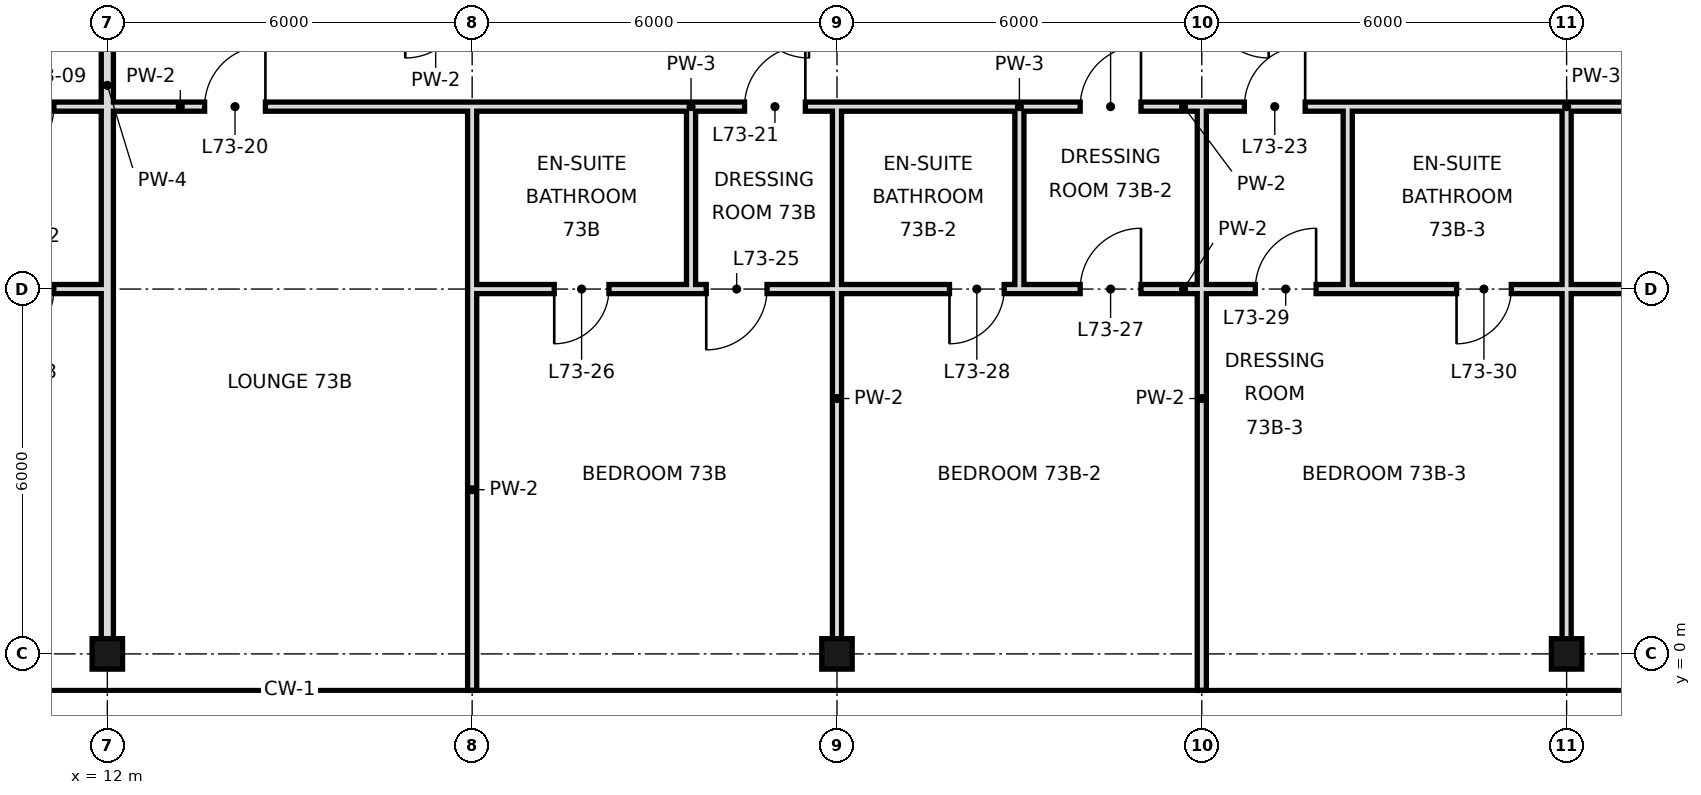
"""IFC4 building model, lengths in metres.
Left out: names, types, materials, properties, quantities, classifications, styles, units other than length and angle.
Written with IfcOpenShell. Run it as: python <this file> out.ifc"""

import sys

from ifc_helpers import new_model, si_unit, direction, frame, frame_2d, origin, origin_2d, place, context, subcontext, project, spatial, rectangle, hollow_rectangle, extrude, element, fill, save


model = new_model("IFC4")
c1 = context("Model", 3, precision=1e-05, world=origin(), true_north=direction((0.0, 1.0)))
c2 = subcontext(c1, "Body", "Model", "MODEL_VIEW")
j1 = project(units=[si_unit("LENGTHUNIT", "METRE"), si_unit("PLANEANGLEUNIT", "RADIAN")], contexts=[c1])
p1 = place(None, origin())
s1 = spatial("IfcSite", under=j1, at=p1, CompositionType="ELEMENT")
p2 = place(p1, origin())
s2 = spatial("IfcBuilding", under=s1, at=p2, CompositionType="ELEMENT")
p3 = place(p2, frame((0.0, 0.0, 308.8)))
s3 = spatial("IfcBuildingStorey", under=s2, at=p3, CompositionType="ELEMENT", Elevation=308.8)
for number, where, z_axis, x_axis in (
    (1, (12.0, 0.0, 0.0), (0.0, 0.0, 1.0), (1.0, 0.0, 0.0)),
    (2, (24.0, 0.0, 0.0), (0.0, 0.0, 1.0), (1.0, 0.0, 0.0)),
    (3, (36.0, 0.0, 0.0), (0.0, 0.0, 1.0), (1.0, 0.0, 0.0)),
):
    element("IfcColumn", number, at=place(p3, frame(where, z_axis=z_axis, x_axis=x_axis)), inside=s3, PredefinedType="COLUMN", context=c2, shape_type="SweptSolid", body=[
        extrude(hollow_rectangle(XDim=0.5, YDim=0.5, WallThickness=0.025, at=origin_2d()), origin(), (0.0, 0.0, 1.0), 3.6),
    ])
p4 = place(p3, frame((12.0, 0.0, 0.0), z_axis=(0.0, 0.0, 1.0), x_axis=(0.0, 1.0, 0.0)))
e4 = element("IfcWall", 4, at=p4, inside=s3, PredefinedType="SOLIDWALL", context=c2, shape_type="SweptSolid", body=[
    extrude(rectangle(XDim=18.7, YDim=0.2, at=frame_2d((9.35, 0.0))), origin(), (0.0, 0.0, 1.0), 2.72),
])
p5 = place(p3, frame((18.0, -0.6, 0.0), z_axis=(0.0, 0.0, 1.0), x_axis=(0.0, 1.0, 0.0)))
e5 = element("IfcWall", 5, at=p5, inside=s3, PredefinedType="PARTITIONING", context=c2, shape_type="SweptSolid", body=[
    extrude(rectangle(XDim=6.6, YDim=0.15, at=frame_2d((3.3, 0.0))), origin(), (0.0, 0.0, 1.0), 2.72),
])
p6 = place(p3, frame((18.0, 6.0, 0.0), z_axis=(0.0, 0.0, 1.0), x_axis=(0.0, 1.0, 0.0)))
e6 = element("IfcWall", 6, at=p6, inside=s3, PredefinedType="PARTITIONING", context=c2, shape_type="SweptSolid", body=[
    extrude(rectangle(XDim=3.0, YDim=0.15, at=frame_2d((1.5, 0.0))), origin(), (0.0, 0.0, 1.0), 2.72),
])
p7 = place(p3, frame((21.6, 6.0, 0.0), z_axis=(0.0, 0.0, 1.0), x_axis=(0.0, 1.0, 0.0)))
e7 = element("IfcWall", 7, at=p7, inside=s3, PredefinedType="PARTITIONING", context=c2, shape_type="SweptSolid", body=[
    extrude(rectangle(XDim=3.0, YDim=0.15, at=frame_2d((1.5, 0.0))), origin(), (0.0, 0.0, 1.0), 3.42),
])
p8 = place(p3, frame((24.0, 0.0, 0.0), z_axis=(0.0, 0.0, 1.0), x_axis=(0.0, 1.0, 0.0)))
e8 = element("IfcWall", 8, at=p8, inside=s3, PredefinedType="PARTITIONING", context=c2, shape_type="SweptSolid", body=[
    extrude(rectangle(XDim=6.0, YDim=0.15, at=frame_2d((3.0, 0.0))), origin(), (0.0, 0.0, 1.0), 2.72),
])
p9 = place(p3, frame((24.0, 6.0, 0.0), z_axis=(0.0, 0.0, 1.0), x_axis=(0.0, 1.0, 0.0)))
e9 = element("IfcWall", 9, at=p9, inside=s3, PredefinedType="PARTITIONING", context=c2, shape_type="SweptSolid", body=[
    extrude(rectangle(XDim=3.0, YDim=0.15, at=frame_2d((1.5, 0.0))), origin(), (0.0, 0.0, 1.0), 2.72),
])
p10 = place(p3, frame((27.0, 6.0, 0.0), z_axis=(0.0, 0.0, 1.0), x_axis=(0.0, 1.0, 0.0)))
e10 = element("IfcWall", 10, at=p10, inside=s3, PredefinedType="PARTITIONING", context=c2, shape_type="SweptSolid", body=[
    extrude(rectangle(XDim=3.0, YDim=0.15, at=frame_2d((1.5, 0.0))), origin(), (0.0, 0.0, 1.0), 3.42),
])
p11 = place(p3, frame((30.0, -0.6, 0.0), z_axis=(0.0, 0.0, 1.0), x_axis=(0.0, 1.0, 0.0)))
e11 = element("IfcWall", 11, at=p11, inside=s3, PredefinedType="PARTITIONING", context=c2, shape_type="SweptSolid", body=[
    extrude(rectangle(XDim=9.6, YDim=0.15, at=frame_2d((4.8, 0.0))), origin(), (0.0, 0.0, 1.0), 2.72),
])
p12 = place(p3, frame((32.4, 6.0, 0.0), z_axis=(0.0, 0.0, 1.0), x_axis=(0.0, 1.0, 0.0)))
e12 = element("IfcWall", 12, at=p12, inside=s3, PredefinedType="PARTITIONING", context=c2, shape_type="SweptSolid", body=[
    extrude(rectangle(XDim=3.0, YDim=0.15, at=frame_2d((1.5, 0.0))), origin(), (0.0, 0.0, 1.0), 3.42),
])
p13 = place(p3, frame((36.0, 0.0, 0.0), z_axis=(0.0, 0.0, 1.0), x_axis=(0.0, 1.0, 0.0)))
e13 = element("IfcWall", 13, at=p13, inside=s3, PredefinedType="PARTITIONING", context=c2, shape_type="SweptSolid", body=[
    extrude(rectangle(XDim=6.0, YDim=0.15, at=frame_2d((3.0, 0.0))), origin(), (0.0, 0.0, 1.0), 2.72),
])
p14 = place(p3, frame((36.0, 6.0, 0.0), z_axis=(0.0, 0.0, 1.0), x_axis=(0.0, 1.0, 0.0)))
e14 = element("IfcWall", 14, at=p14, inside=s3, PredefinedType="PARTITIONING", context=c2, shape_type="SweptSolid", body=[
    extrude(rectangle(XDim=3.0, YDim=0.15, at=frame_2d((1.5, 0.0))), origin(), (0.0, 0.0, 1.0), 2.72),
])
p15 = place(p3, frame((8.4, 6.0, 0.0), z_axis=(0.0, 0.0, 1.0), x_axis=(1.0, 0.0, 0.0)))
e15 = element("IfcWall", 15, at=p15, inside=s3, PredefinedType="PARTITIONING", context=c2, shape_type="SweptSolid", body=[
    extrude(rectangle(XDim=3.6, YDim=0.15, at=frame_2d((1.8, 0.0))), origin(), (0.0, 0.0, 1.0), 2.97),
])
p16 = place(p15, frame((1.72, 0.0, 0.0)))
e16 = element("IfcOpeningElement", 16, at=p16, cuts=e15, PredefinedType="OPENING", context=c2, shape_type="SweptSolid", body=[
    extrude(rectangle(XDim=1.0, YDim=2.4, at=frame_2d((0.5, 1.2))), frame((0.0, 0.085, 0.0), z_axis=(0.0, -1.0, 0.0), x_axis=(1.0, 0.0, 0.0)), (0.0, 0.0, 1.0), 0.17),
])
p17 = place(p3, frame((21.6, 6.0, 0.0), z_axis=(0.0, 0.0, 1.0), x_axis=(1.0, 0.0, 0.0)))
e17 = element("IfcWall", 17, at=p17, inside=s3, PredefinedType="PARTITIONING", context=c2, shape_type="SweptSolid", body=[
    extrude(rectangle(XDim=2.4, YDim=0.15, at=frame_2d((1.2, 0.0))), origin(), (0.0, 0.0, 1.0), 2.97),
])
p18 = place(p17, frame((0.25, 0.0, 0.0)))
e18 = element("IfcOpeningElement", 18, at=p18, cuts=e17, PredefinedType="OPENING", context=c2, shape_type="SweptSolid", body=[
    extrude(rectangle(XDim=1.0, YDim=2.4, at=frame_2d((0.5, 1.2))), frame((0.0, 0.085, 0.0), z_axis=(0.0, -1.0, 0.0), x_axis=(1.0, 0.0, 0.0)), (0.0, 0.0, 1.0), 0.17),
])
p19 = place(p3, frame((27.0, 6.0, 0.0), z_axis=(0.0, 0.0, 1.0), x_axis=(1.0, 0.0, 0.0)))
e19 = element("IfcWall", 19, at=p19, inside=s3, PredefinedType="PARTITIONING", context=c2, shape_type="SweptSolid", body=[
    extrude(rectangle(XDim=5.4, YDim=0.15, at=frame_2d((2.7, 0.0))), origin(), (0.0, 0.0, 1.0), 2.97),
])
p20 = place(p19, frame((1.0, 0.0, 0.0)))
e20 = element("IfcOpeningElement", 20, at=p20, cuts=e19, PredefinedType="OPENING", context=c2, shape_type="SweptSolid", body=[
    extrude(rectangle(XDim=1.0, YDim=2.4, at=frame_2d((0.5, 1.2))), frame((0.0, 0.085, 0.0), z_axis=(0.0, -1.0, 0.0), x_axis=(1.0, 0.0, 0.0)), (0.0, 0.0, 1.0), 0.17),
])
p21 = place(p19, frame((3.88, 0.0, 0.0)))
e21 = element("IfcOpeningElement", 21, at=p21, cuts=e19, PredefinedType="OPENING", context=c2, shape_type="SweptSolid", body=[
    extrude(rectangle(XDim=1.0, YDim=2.4, at=frame_2d((0.5, 1.2))), frame((0.0, 0.085, 0.0), z_axis=(0.0, -1.0, 0.0), x_axis=(1.0, 0.0, 0.0)), (0.0, 0.0, 1.0), 0.17),
])
p22 = place(p3, frame((36.0, 6.0, 0.0), z_axis=(0.0, 0.0, 1.0), x_axis=(1.0, 0.0, 0.0)))
e22 = element("IfcWall", 22, at=p22, inside=s3, PredefinedType="PARTITIONING", context=c2, shape_type="SweptSolid", body=[
    extrude(rectangle(XDim=12.0, YDim=0.15, at=frame_2d((6.0, 0.0))), origin(), (0.0, 0.0, 1.0), 2.97),
])
p23 = place(p22, frame((5.1, 0.0, 0.0)))
e23 = element("IfcOpeningElement", 23, at=p23, cuts=e22, PredefinedType="OPENING", context=c2, shape_type="SweptSolid", body=[
    extrude(rectangle(XDim=1.8, YDim=2.4, at=frame_2d((0.9, 1.2))), frame((0.0, 0.085, 0.0), z_axis=(0.0, -1.0, 0.0), x_axis=(1.0, 0.0, 0.0)), (0.0, 0.0, 1.0), 0.17),
])
p24 = place(p3, frame((18.0, 6.0, 0.0), z_axis=(0.0, 0.0, 1.0), x_axis=(1.0, 0.0, 0.0)))
e24 = element("IfcWall", 24, at=p24, inside=s3, PredefinedType="PARTITIONING", context=c2, shape_type="SweptSolid", body=[
    extrude(rectangle(XDim=3.6, YDim=0.15, at=frame_2d((1.8, 0.0))), origin(), (0.0, 0.0, 1.0), 2.97),
])
p25 = place(p24, frame((1.35, 0.0, 0.0)))
e25 = element("IfcOpeningElement", 25, at=p25, cuts=e24, PredefinedType="OPENING", context=c2, shape_type="SweptSolid", body=[
    extrude(rectangle(XDim=0.9, YDim=2.4, at=frame_2d((0.45, 1.2))), frame((0.0, 0.085, 0.0), z_axis=(0.0, -1.0, 0.0), x_axis=(1.0, 0.0, 0.0)), (0.0, 0.0, 1.0), 0.17),
])
p26 = place(p3, frame((24.0, 6.0, 0.0), z_axis=(0.0, 0.0, 1.0), x_axis=(1.0, 0.0, 0.0)))
e26 = element("IfcWall", 26, at=p26, inside=s3, PredefinedType="PARTITIONING", context=c2, shape_type="SweptSolid", body=[
    extrude(rectangle(XDim=3.0, YDim=0.15, at=frame_2d((1.5, 0.0))), origin(), (0.0, 0.0, 1.0), 2.97),
])
p27 = place(p26, frame((1.85, 0.0, 0.0)))
e27 = element("IfcOpeningElement", 27, at=p27, cuts=e26, PredefinedType="OPENING", context=c2, shape_type="SweptSolid", body=[
    extrude(rectangle(XDim=0.9, YDim=2.4, at=frame_2d((0.45, 1.2))), frame((0.0, 0.085, 0.0), z_axis=(0.0, -1.0, 0.0), x_axis=(1.0, 0.0, 0.0)), (0.0, 0.0, 1.0), 0.17),
])
p28 = place(p3, frame((32.4, 6.0, 0.0), z_axis=(0.0, 0.0, 1.0), x_axis=(1.0, 0.0, 0.0)))
e28 = element("IfcWall", 28, at=p28, inside=s3, PredefinedType="PARTITIONING", context=c2, shape_type="SweptSolid", body=[
    extrude(rectangle(XDim=3.6, YDim=0.15, at=frame_2d((1.8, 0.0))), origin(), (0.0, 0.0, 1.0), 2.97),
])
p29 = place(p28, frame((1.79, 0.0, 0.0)))
e29 = element("IfcOpeningElement", 29, at=p29, cuts=e28, PredefinedType="OPENING", context=c2, shape_type="SweptSolid", body=[
    extrude(rectangle(XDim=0.9, YDim=2.4, at=frame_2d((0.45, 1.2))), frame((0.0, 0.085, 0.0), z_axis=(0.0, -1.0, 0.0), x_axis=(1.0, 0.0, 0.0)), (0.0, 0.0, 1.0), 0.17),
])
p30 = place(p3, frame((8.4, 9.0, 0.0), z_axis=(0.0, 0.0, 1.0), x_axis=(1.0, 0.0, 0.0)))
e30 = element("IfcWall", 30, at=p30, inside=s3, PredefinedType="PARTITIONING", context=c2, shape_type="SweptSolid", body=[
    extrude(rectangle(XDim=9.6, YDim=0.15, at=frame_2d((4.8, 0.0))), origin(), (0.0, 0.0, 1.0), 3.42),
])
p31 = place(p30, frame((1.72, 0.0, 0.0)))
e31 = element("IfcOpeningElement", 31, at=p31, cuts=e30, PredefinedType="OPENING", context=c2, shape_type="SweptSolid", body=[
    extrude(rectangle(XDim=1.0, YDim=2.4, at=frame_2d((0.5, 1.2))), frame((0.0, 0.085, 0.0), z_axis=(0.0, -1.0, 0.0), x_axis=(1.0, 0.0, 0.0)), (0.0, 0.0, 1.0), 0.17),
])
p32 = place(p30, frame((5.2, 0.0, 0.0)))
e32 = element("IfcOpeningElement", 32, at=p32, cuts=e30, PredefinedType="OPENING", context=c2, shape_type="SweptSolid", body=[
    extrude(rectangle(XDim=1.0, YDim=2.4, at=frame_2d((0.5, 1.2))), frame((0.0, 0.085, 0.0), z_axis=(0.0, -1.0, 0.0), x_axis=(1.0, 0.0, 0.0)), (0.0, 0.0, 1.0), 0.17),
])
p33 = place(p3, frame((21.6, 9.0, 0.0), z_axis=(0.0, 0.0, 1.0), x_axis=(1.0, 0.0, 0.0)))
e33 = element("IfcWall", 33, at=p33, inside=s3, PredefinedType="PARTITIONING", context=c2, shape_type="SweptSolid", body=[
    extrude(rectangle(XDim=2.4, YDim=0.15, at=frame_2d((1.2, 0.0))), origin(), (0.0, 0.0, 1.0), 3.42),
])
p34 = place(p33, frame((0.88, 0.0, 0.0)))
e34 = element("IfcOpeningElement", 34, at=p34, cuts=e33, PredefinedType="OPENING", context=c2, shape_type="SweptSolid", body=[
    extrude(rectangle(XDim=1.0, YDim=2.4, at=frame_2d((0.5, 1.2))), frame((0.0, 0.085, 0.0), z_axis=(0.0, -1.0, 0.0), x_axis=(1.0, 0.0, 0.0)), (0.0, 0.0, 1.0), 0.17),
])
p35 = place(p3, frame((27.0, 9.0, 0.0), z_axis=(0.0, 0.0, 1.0), x_axis=(1.0, 0.0, 0.0)))
e35 = element("IfcWall", 35, at=p35, inside=s3, PredefinedType="PARTITIONING", context=c2, shape_type="SweptSolid", body=[
    extrude(rectangle(XDim=5.4, YDim=0.15, at=frame_2d((2.7, 0.0))), origin(), (0.0, 0.0, 1.0), 3.42),
])
p36 = place(p35, frame((1.0, 0.0, 0.0)))
e36 = element("IfcOpeningElement", 36, at=p36, cuts=e35, PredefinedType="OPENING", context=c2, shape_type="SweptSolid", body=[
    extrude(rectangle(XDim=1.0, YDim=2.4, at=frame_2d((0.5, 1.2))), frame((0.0, 0.085, 0.0), z_axis=(0.0, -1.0, 0.0), x_axis=(1.0, 0.0, 0.0)), (0.0, 0.0, 1.0), 0.17),
])
p37 = place(p35, frame((3.7, 0.0, 0.0)))
e37 = element("IfcOpeningElement", 37, at=p37, cuts=e35, PredefinedType="OPENING", context=c2, shape_type="SweptSolid", body=[
    extrude(rectangle(XDim=1.0, YDim=2.4, at=frame_2d((0.5, 1.2))), frame((0.0, 0.085, 0.0), z_axis=(0.0, -1.0, 0.0), x_axis=(1.0, 0.0, 0.0)), (0.0, 0.0, 1.0), 0.17),
])
p38 = place(p3, frame((36.0, 9.0, 0.0), z_axis=(0.0, 0.0, 1.0), x_axis=(1.0, 0.0, 0.0)))
e38 = element("IfcWall", 38, at=p38, inside=s3, PredefinedType="PARTITIONING", context=c2, shape_type="SweptSolid", body=[
    extrude(rectangle(XDim=12.6, YDim=0.15, at=frame_2d((6.3, 0.0))), origin(), (0.0, 0.0, 1.0), 3.42),
])
p39 = place(p38, frame((7.04, 0.0, 0.0)))
e39 = element("IfcOpeningElement", 39, at=p39, cuts=e38, PredefinedType="OPENING", context=c2, shape_type="SweptSolid", body=[
    extrude(rectangle(XDim=1.8, YDim=2.4, at=frame_2d((0.9, 1.2))), frame((0.0, 0.085, 0.0), z_axis=(0.0, -1.0, 0.0), x_axis=(1.0, 0.0, 0.0)), (0.0, 0.0, 1.0), 0.17),
])
p40 = place(p3, frame((18.0, 9.0, 0.0), z_axis=(0.0, 0.0, 1.0), x_axis=(1.0, 0.0, 0.0)))
e40 = element("IfcWall", 40, at=p40, inside=s3, PredefinedType="PARTITIONING", context=c2, shape_type="SweptSolid", body=[
    extrude(rectangle(XDim=3.6, YDim=0.15, at=frame_2d((1.8, 0.0))), origin(), (0.0, 0.0, 1.0), 3.42),
])
p41 = place(p3, frame((24.0, 9.0, 0.0), z_axis=(0.0, 0.0, 1.0), x_axis=(1.0, 0.0, 0.0)))
e41 = element("IfcWall", 41, at=p41, inside=s3, PredefinedType="PARTITIONING", context=c2, shape_type="SweptSolid", body=[
    extrude(rectangle(XDim=3.0, YDim=0.15, at=frame_2d((1.5, 0.0))), origin(), (0.0, 0.0, 1.0), 3.42),
])
p42 = place(p3, frame((32.4, 9.0, 0.0), z_axis=(0.0, 0.0, 1.0), x_axis=(1.0, 0.0, 0.0)))
e42 = element("IfcWall", 42, at=p42, inside=s3, PredefinedType="PARTITIONING", context=c2, shape_type="SweptSolid", body=[
    extrude(rectangle(XDim=3.6, YDim=0.15, at=frame_2d((1.8, 0.0))), origin(), (0.0, 0.0, 1.0), 3.42),
])
p43 = place(p31, frame((1.0, 0.0, 0.0), z_axis=(0.0, 0.0, 1.0), x_axis=(-1.0, 0.0, 0.0)))
e43 = element("IfcDoor", 43, at=p43, inside=s3, OperationType="SINGLE_SWING_RIGHT", PredefinedType="DOOR", context=c2, shape_type="SweptSolid", body=[
    extrude(rectangle(XDim=1.0, YDim=2.4, at=frame_2d((0.5, 1.2))), frame((0.0, 0.025, 0.0), z_axis=(0.0, -1.0, 0.0), x_axis=(1.0, 0.0, 0.0)), (0.0, 0.0, 1.0), 0.05),
])
fill(e31, e43)
p44 = place(p16, frame((1.0, 0.0, 0.0), z_axis=(0.0, 0.0, 1.0), x_axis=(-1.0, 0.0, 0.0)))
e44 = element("IfcDoor", 44, at=p44, inside=s3, OperationType="SINGLE_SWING_RIGHT", PredefinedType="DOOR", context=c2, shape_type="SweptSolid", body=[
    extrude(rectangle(XDim=1.0, YDim=2.4, at=frame_2d((0.5, 1.2))), frame((0.0, 0.025, 0.0), z_axis=(0.0, -1.0, 0.0), x_axis=(1.0, 0.0, 0.0)), (0.0, 0.0, 1.0), 0.05),
])
fill(e16, e44)
p45 = place(p32, frame((1.0, 0.0, 0.0), z_axis=(0.0, 0.0, 1.0), x_axis=(-1.0, 0.0, 0.0)))
e45 = element("IfcDoor", 45, at=p45, inside=s3, OperationType="SINGLE_SWING_LEFT", PredefinedType="DOOR", context=c2, shape_type="SweptSolid", body=[
    extrude(rectangle(XDim=1.0, YDim=2.4, at=frame_2d((0.5, 1.2))), frame((0.0, 0.025, 0.0), z_axis=(0.0, -1.0, 0.0), x_axis=(1.0, 0.0, 0.0)), (0.0, 0.0, 1.0), 0.05),
])
fill(e32, e45)
p46 = place(p34, frame((1.0, 0.0, 0.0), z_axis=(0.0, 0.0, 1.0), x_axis=(-1.0, 0.0, 0.0)))
e46 = element("IfcDoor", 46, at=p46, inside=s3, OperationType="SINGLE_SWING_LEFT", PredefinedType="DOOR", context=c2, shape_type="SweptSolid", body=[
    extrude(rectangle(XDim=1.0, YDim=2.4, at=frame_2d((0.5, 1.2))), frame((0.0, 0.025, 0.0), z_axis=(0.0, -1.0, 0.0), x_axis=(1.0, 0.0, 0.0)), (0.0, 0.0, 1.0), 0.05),
])
fill(e34, e46)
p47 = place(p36, frame((1.0, 0.0, 0.0), z_axis=(0.0, 0.0, 1.0), x_axis=(-1.0, 0.0, 0.0)))
e47 = element("IfcDoor", 47, at=p47, inside=s3, OperationType="SINGLE_SWING_LEFT", PredefinedType="DOOR", context=c2, shape_type="SweptSolid", body=[
    extrude(rectangle(XDim=1.0, YDim=2.4, at=frame_2d((0.5, 1.2))), frame((0.0, 0.025, 0.0), z_axis=(0.0, -1.0, 0.0), x_axis=(1.0, 0.0, 0.0)), (0.0, 0.0, 1.0), 0.05),
])
fill(e36, e47)
p48 = place(p37, frame((1.0, 0.0, 0.0), z_axis=(0.0, 0.0, 1.0), x_axis=(-1.0, 0.0, 0.0)))
e48 = element("IfcDoor", 48, at=p48, inside=s3, OperationType="SINGLE_SWING_LEFT", PredefinedType="DOOR", context=c2, shape_type="SweptSolid", body=[
    extrude(rectangle(XDim=1.0, YDim=2.4, at=frame_2d((0.5, 1.2))), frame((0.0, 0.025, 0.0), z_axis=(0.0, -1.0, 0.0), x_axis=(1.0, 0.0, 0.0)), (0.0, 0.0, 1.0), 0.05),
])
fill(e37, e48)
p49 = place(p18, frame((1.0, 0.0, 0.0), z_axis=(0.0, 0.0, 1.0), x_axis=(-1.0, 0.0, 0.0)))
e49 = element("IfcDoor", 49, at=p49, inside=s3, OperationType="SINGLE_SWING_RIGHT", PredefinedType="DOOR", context=c2, shape_type="SweptSolid", body=[
    extrude(rectangle(XDim=1.0, YDim=2.4, at=frame_2d((0.5, 1.2))), frame((0.0, 0.025, 0.0), z_axis=(0.0, -1.0, 0.0), x_axis=(1.0, 0.0, 0.0)), (0.0, 0.0, 1.0), 0.05),
])
fill(e18, e49)
p50 = place(p25, frame((0.9, 0.0, 0.0), z_axis=(0.0, 0.0, 1.0), x_axis=(-1.0, 0.0, 0.0)))
e50 = element("IfcDoor", 50, at=p50, inside=s3, OperationType="SINGLE_SWING_RIGHT", PredefinedType="DOOR", context=c2, shape_type="SweptSolid", body=[
    extrude(rectangle(XDim=0.9, YDim=2.4, at=frame_2d((0.45, 1.2))), frame((0.0, 0.025, 0.0), z_axis=(0.0, -1.0, 0.0), x_axis=(1.0, 0.0, 0.0)), (0.0, 0.0, 1.0), 0.05),
])
fill(e25, e50)
p51 = place(p20, frame((1.0, 0.0, 0.0), z_axis=(0.0, 0.0, 1.0), x_axis=(-1.0, 0.0, 0.0)))
e51 = element("IfcDoor", 51, at=p51, inside=s3, OperationType="SINGLE_SWING_LEFT", PredefinedType="DOOR", context=c2, shape_type="SweptSolid", body=[
    extrude(rectangle(XDim=1.0, YDim=2.4, at=frame_2d((0.5, 1.2))), frame((0.0, 0.025, 0.0), z_axis=(0.0, -1.0, 0.0), x_axis=(1.0, 0.0, 0.0)), (0.0, 0.0, 1.0), 0.05),
])
fill(e20, e51)
p52 = place(p27, frame((0.9, 0.0, 0.0), z_axis=(0.0, 0.0, 1.0), x_axis=(-1.0, 0.0, 0.0)))
e52 = element("IfcDoor", 52, at=p52, inside=s3, OperationType="SINGLE_SWING_RIGHT", PredefinedType="DOOR", context=c2, shape_type="SweptSolid", body=[
    extrude(rectangle(XDim=0.9, YDim=2.4, at=frame_2d((0.45, 1.2))), frame((0.0, 0.025, 0.0), z_axis=(0.0, -1.0, 0.0), x_axis=(1.0, 0.0, 0.0)), (0.0, 0.0, 1.0), 0.05),
])
fill(e27, e52)
p53 = place(p21, frame((1.0, 0.0, 0.0), z_axis=(0.0, 0.0, 1.0), x_axis=(-1.0, 0.0, 0.0)))
e53 = element("IfcDoor", 53, at=p53, inside=s3, OperationType="SINGLE_SWING_LEFT", PredefinedType="DOOR", context=c2, shape_type="SweptSolid", body=[
    extrude(rectangle(XDim=1.0, YDim=2.4, at=frame_2d((0.5, 1.2))), frame((0.0, 0.025, 0.0), z_axis=(0.0, -1.0, 0.0), x_axis=(1.0, 0.0, 0.0)), (0.0, 0.0, 1.0), 0.05),
])
fill(e21, e53)
p54 = place(p29, frame((0.9, 0.0, 0.0), z_axis=(0.0, 0.0, 1.0), x_axis=(-1.0, 0.0, 0.0)))
e54 = element("IfcDoor", 54, at=p54, inside=s3, OperationType="SINGLE_SWING_RIGHT", PredefinedType="DOOR", context=c2, shape_type="SweptSolid", body=[
    extrude(rectangle(XDim=0.9, YDim=2.4, at=frame_2d((0.45, 1.2))), frame((0.0, 0.025, 0.0), z_axis=(0.0, -1.0, 0.0), x_axis=(1.0, 0.0, 0.0)), (0.0, 0.0, 1.0), 0.05),
])
fill(e29, e54)
save(model, sys.argv[1])
